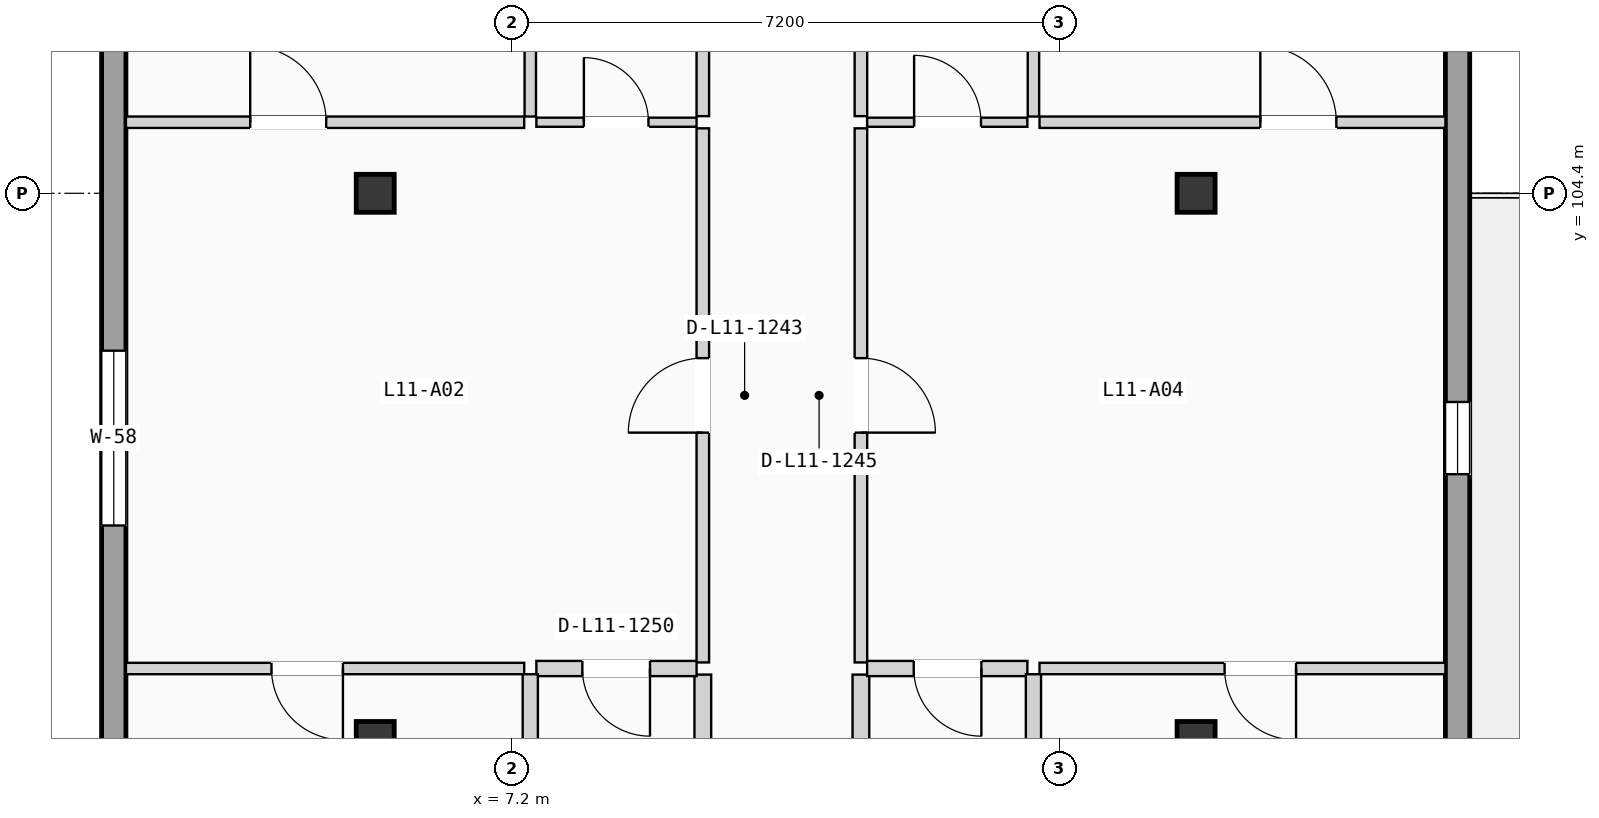
"""IFC4 building model, lengths in metres.
Left out: names, types, materials, properties, quantities, classifications, styles, units other than length and angle.
Written with IfcOpenShell. Run it as: python <this file> out.ifc"""

import sys

from ifc_helpers import new_model, si_unit, direction, frame, frame_2d, origin, origin_2d, place, context, subcontext, project, spatial, rectangle, extrude, element, fill, save


model = new_model("IFC4")
c1 = context("Model", 3, precision=1e-05, world=origin(), true_north=direction((0.0, 1.0)))
c2 = subcontext(c1, "Body", "Model", "MODEL_VIEW")
j1 = project(units=[si_unit("LENGTHUNIT", "METRE"), si_unit("PLANEANGLEUNIT", "RADIAN")], contexts=[c1])
p1 = place(None, origin())
s1 = spatial("IfcSite", under=j1, at=p1, CompositionType="ELEMENT")
p2 = place(p1, origin())
s2 = spatial("IfcBuilding", under=s1, at=p2, CompositionType="ELEMENT")
p3 = place(p2, frame((0.0, 0.0, 37.275)))
s3 = spatial("IfcBuildingStorey", under=s2, at=p3, CompositionType="ELEMENT", Elevation=37.275)
for number, where, z_axis, x_axis in (
    (1, (5.4, 97.2, 0.0), (0.0, 0.0, 1.0), (1.0, 0.0, 0.0)),
    (2, (5.4, 104.4, 0.0), (0.0, 0.0, 1.0), (1.0, 0.0, 0.0)),
    (3, (16.2, 97.2, 0.0), (0.0, 0.0, 1.0), (1.0, 0.0, 0.0)),
    (4, (16.2, 104.4, 0.0), (0.0, 0.0, 1.0), (1.0, 0.0, 0.0)),
):
    element("IfcColumn", number, at=place(p3, frame(where, z_axis=z_axis, x_axis=x_axis)), inside=s3, PredefinedType="COLUMN", context=c2, shape_type="SweptSolid", body=[
        extrude(rectangle(XDim=0.5, YDim=0.5, at=origin_2d()), origin(), (0.0, 0.0, 1.0), 3.15),
    ])
p4 = place(p3, frame((1.96, 68.72, 0.0), z_axis=(0.0, 0.0, 1.0), x_axis=(0.0, 1.0, 0.0)))
e5 = element("IfcWall", 5, at=p4, inside=s3, PredefinedType="SOLIDWALL", context=c2, shape_type="SweptSolid", body=[
    extrude(rectangle(XDim=49.76, YDim=0.32, at=frame_2d((24.88, 0.0))), origin(), (0.0, 0.0, 1.0), 2.9),
])
p5 = place(p4, frame((15.855, 0.0, 0.85)))
e6 = element("IfcOpeningElement", 6, at=p5, cuts=e5, PredefinedType="OPENING", context=c2, shape_type="SweptSolid", body=[
    extrude(rectangle(XDim=0.95, YDim=1.2, at=frame_2d((0.475, 0.6))), frame((0.0, 0.17, 0.0), z_axis=(0.0, -1.0, 0.0), x_axis=(1.0, 0.0, 0.0)), (0.0, 0.0, 1.0), 0.34),
])
p6 = place(p4, frame((8.586, 0.0, 0.9)))
e7 = element("IfcOpeningElement", 7, at=p6, cuts=e5, PredefinedType="OPENING", context=c2, shape_type="SweptSolid", body=[
    extrude(rectangle(XDim=2.3, YDim=1.2, at=frame_2d((1.15, 0.6))), frame((0.0, 0.17, 0.0), z_axis=(0.0, -1.0, 0.0), x_axis=(1.0, 0.0, 0.0)), (0.0, 0.0, 1.0), 0.34),
])
p7 = place(p4, frame((19.265, 0.0, 0.85)))
e8 = element("IfcOpeningElement", 8, at=p7, cuts=e5, PredefinedType="OPENING", context=c2, shape_type="SweptSolid", body=[
    extrude(rectangle(XDim=0.95, YDim=1.2, at=frame_2d((0.475, 0.6))), frame((0.0, 0.17, 0.0), z_axis=(0.0, -1.0, 0.0), x_axis=(1.0, 0.0, 0.0)), (0.0, 0.0, 1.0), 0.34),
])
p8 = place(p4, frame((31.309, 0.0, 0.715)))
e9 = element("IfcOpeningElement", 9, at=p8, cuts=e5, PredefinedType="OPENING", context=c2, shape_type="SweptSolid", body=[
    extrude(rectangle(XDim=2.3, YDim=1.5, at=frame_2d((1.15, 0.75))), frame((0.0, 0.17, 0.0), z_axis=(0.0, -1.0, 0.0), x_axis=(1.0, 0.0, 0.0)), (0.0, 0.0, 1.0), 0.34),
])
p9 = place(p4, frame((24.736, 0.0, 0.565)))
e10 = element("IfcOpeningElement", 10, at=p9, cuts=e5, PredefinedType="OPENING", context=c2, shape_type="SweptSolid", body=[
    extrude(rectangle(XDim=2.3, YDim=1.65, at=frame_2d((1.15, 0.825))), frame((0.0, 0.17, 0.0), z_axis=(0.0, -1.0, 0.0), x_axis=(1.0, 0.0, 0.0)), (0.0, 0.0, 1.0), 0.34),
])
p10 = place(p4, frame((39.113, 0.0, 0.85)))
e11 = element("IfcOpeningElement", 11, at=p10, cuts=e5, PredefinedType="OPENING", context=c2, shape_type="SweptSolid", body=[
    extrude(rectangle(XDim=0.95, YDim=1.2, at=frame_2d((0.475, 0.6))), frame((0.0, 0.17, 0.0), z_axis=(0.0, -1.0, 0.0), x_axis=(1.0, 0.0, 0.0)), (0.0, 0.0, 1.0), 0.34),
])
p11 = place(p3, frame((19.64, 68.72, 0.0), z_axis=(0.0, 0.0, 1.0), x_axis=(0.0, 1.0, 0.0)))
e12 = element("IfcWall", 12, at=p11, inside=s3, PredefinedType="SOLIDWALL", context=c2, shape_type="SweptSolid", body=[
    extrude(rectangle(XDim=49.76, YDim=0.32, at=frame_2d((24.88, 0.0))), origin(), (0.0, 0.0, 1.0), 2.9),
])
p12 = place(p11, frame((16.27, 0.0, 0.0)))
e13 = element("IfcOpeningElement", 13, at=p12, cuts=e12, PredefinedType="OPENING", context=c2, shape_type="SweptSolid", body=[
    extrude(rectangle(XDim=0.95, YDim=2.15, at=frame_2d((0.475, 1.075))), frame((0.0, 0.17, 0.0), z_axis=(0.0, -1.0, 0.0), x_axis=(1.0, 0.0, 0.0)), (0.0, 0.0, 1.0), 0.34),
])
p13 = place(p11, frame((9.261, 0.0, 0.9)))
e14 = element("IfcOpeningElement", 14, at=p13, cuts=e12, PredefinedType="OPENING", context=c2, shape_type="SweptSolid", body=[
    extrude(rectangle(XDim=0.95, YDim=1.2, at=frame_2d((0.475, 0.6))), frame((0.0, 0.17, 0.0), z_axis=(0.0, -1.0, 0.0), x_axis=(1.0, 0.0, 0.0)), (0.0, 0.0, 1.0), 0.34),
])
p14 = place(p11, frame((19.265, 0.0, 0.865)))
e15 = element("IfcOpeningElement", 15, at=p14, cuts=e12, PredefinedType="OPENING", context=c2, shape_type="SweptSolid", body=[
    extrude(rectangle(XDim=0.95, YDim=1.35, at=frame_2d((0.475, 0.675))), frame((0.0, 0.17, 0.0), z_axis=(0.0, -1.0, 0.0), x_axis=(1.0, 0.0, 0.0)), (0.0, 0.0, 1.0), 0.34),
])
p15 = place(p11, frame((31.984, 0.0, 0.715)))
e16 = element("IfcOpeningElement", 16, at=p15, cuts=e12, PredefinedType="OPENING", context=c2, shape_type="SweptSolid", body=[
    extrude(rectangle(XDim=0.95, YDim=1.5, at=frame_2d((0.475, 0.75))), frame((0.0, 0.17, 0.0), z_axis=(0.0, -1.0, 0.0), x_axis=(1.0, 0.0, 0.0)), (0.0, 0.0, 1.0), 0.34),
])
p16 = place(p11, frame((25.411, 0.0, 0.565)))
e17 = element("IfcOpeningElement", 17, at=p16, cuts=e12, PredefinedType="OPENING", context=c2, shape_type="SweptSolid", body=[
    extrude(rectangle(XDim=0.95, YDim=1.65, at=frame_2d((0.475, 0.825))), frame((0.0, 0.17, 0.0), z_axis=(0.0, -1.0, 0.0), x_axis=(1.0, 0.0, 0.0)), (0.0, 0.0, 1.0), 0.34),
])
p17 = place(p11, frame((39.113, 0.0, 0.85)))
e18 = element("IfcOpeningElement", 18, at=p17, cuts=e12, PredefinedType="OPENING", context=c2, shape_type="SweptSolid", body=[
    extrude(rectangle(XDim=0.95, YDim=1.2, at=frame_2d((0.475, 0.6))), frame((0.0, 0.17, 0.0), z_axis=(0.0, -1.0, 0.0), x_axis=(1.0, 0.0, 0.0)), (0.0, 0.0, 1.0), 0.34),
])
p18 = place(p3, frame((9.71, 98.227, 0.0), z_axis=(0.0, 0.0, 1.0), x_axis=(0.0, 1.0, 0.0)))
e19 = element("IfcWall", 19, at=p18, inside=s3, PredefinedType="PARTITIONING", context=c2, shape_type="SweptSolid", body=[
    extrude(rectangle(XDim=7.028, YDim=0.165, at=frame_2d((3.514, 0.0))), origin(), (0.0, 0.0, 1.0), 2.87),
])
p19 = place(p18, frame((3.024, 0.0, 0.0)))
e20 = element("IfcOpeningElement", 20, at=p19, cuts=e19, PredefinedType="OPENING", context=c2, shape_type="SweptSolid", body=[
    extrude(rectangle(XDim=0.98, YDim=2.08, at=frame_2d((0.49, 1.04))), frame((0.0, 0.093, 0.0), z_axis=(0.0, -1.0, 0.0), x_axis=(1.0, 0.0, 0.0)), (0.0, 0.0, 1.0), 0.185),
])
p20 = place(p3, frame((9.71, 92.282, 0.0), z_axis=(0.0, 0.0, 1.0), x_axis=(0.0, 1.0, 0.0)))
e21 = element("IfcWall", 21, at=p20, inside=s3, PredefinedType="PLUMBINGWALL", context=c2, shape_type="SweptSolid", body=[
    extrude(rectangle(XDim=5.785, YDim=0.22, at=frame_2d((2.893, 0.0))), origin(), (0.0, 0.0, 1.0), 2.87),
])
p21 = place(p3, frame((9.71, 105.415, 0.0), z_axis=(0.0, 0.0, 1.0), x_axis=(0.0, 1.0, 0.0)))
e22 = element("IfcWall", 22, at=p21, inside=s3, PredefinedType="PARTITIONING", context=c2, shape_type="SweptSolid", body=[
    extrude(rectangle(XDim=5.785, YDim=0.165, at=frame_2d((2.893, 0.0))), origin(), (0.0, 0.0, 1.0), 2.87),
])
p22 = place(p3, frame((11.79, 98.227, 0.0), z_axis=(0.0, 0.0, 1.0), x_axis=(0.0, 1.0, 0.0)))
e23 = element("IfcWall", 23, at=p22, inside=s3, PredefinedType="PARTITIONING", context=c2, shape_type="SweptSolid", body=[
    extrude(rectangle(XDim=7.028, YDim=0.165, at=frame_2d((3.514, 0.0))), origin(), (0.0, 0.0, 1.0), 2.87),
])
p23 = place(p22, frame((3.024, 0.0, 0.0)))
e24 = element("IfcOpeningElement", 24, at=p23, cuts=e23, PredefinedType="OPENING", context=c2, shape_type="SweptSolid", body=[
    extrude(rectangle(XDim=0.98, YDim=2.08, at=frame_2d((0.49, 1.04))), frame((0.0, 0.093, 0.0), z_axis=(0.0, -1.0, 0.0), x_axis=(1.0, 0.0, 0.0)), (0.0, 0.0, 1.0), 0.185),
])
p24 = place(p3, frame((11.79, 92.282, 0.0), z_axis=(0.0, 0.0, 1.0), x_axis=(0.0, 1.0, 0.0)))
e25 = element("IfcWall", 25, at=p24, inside=s3, PredefinedType="PLUMBINGWALL", context=c2, shape_type="SweptSolid", body=[
    extrude(rectangle(XDim=5.785, YDim=0.22, at=frame_2d((2.893, 0.0))), origin(), (0.0, 0.0, 1.0), 2.87),
])
p25 = place(p3, frame((11.79, 105.415, 0.0), z_axis=(0.0, 0.0, 1.0), x_axis=(0.0, 1.0, 0.0)))
e26 = element("IfcWall", 26, at=p25, inside=s3, PredefinedType="PARTITIONING", context=c2, shape_type="SweptSolid", body=[
    extrude(rectangle(XDim=5.785, YDim=0.165, at=frame_2d((2.893, 0.0))), origin(), (0.0, 0.0, 1.0), 2.87),
])
p26 = place(p3, frame((7.52, 98.147, 0.0), z_axis=(0.0, 0.0, 1.0), x_axis=(1.0, 0.0, 0.0)))
e27 = element("IfcWall", 27, at=p26, inside=s3, PredefinedType="PLUMBINGWALL", context=c2, shape_type="SweptSolid", body=[
    extrude(rectangle(XDim=2.108, YDim=0.2, at=frame_2d((1.054, 0.0))), origin(), (0.0, 0.0, 1.0), 2.87),
])
p27 = place(p26, frame((0.605, 0.0, 0.0)))
e28 = element("IfcOpeningElement", 28, at=p27, cuts=e27, PredefinedType="OPENING", context=c2, shape_type="SweptSolid", body=[
    extrude(rectangle(XDim=0.89, YDim=2.03, at=frame_2d((0.445, 1.015))), frame((0.0, 0.11, 0.0), z_axis=(0.0, -1.0, 0.0), x_axis=(1.0, 0.0, 0.0)), (0.0, 0.0, 1.0), 0.22),
])
p28 = place(p3, frame((7.52, 105.335, 0.0), z_axis=(0.0, 0.0, 1.0), x_axis=(1.0, 0.0, 0.0)))
e29 = element("IfcWall", 29, at=p28, inside=s3, PredefinedType="PARTITIONING", context=c2, shape_type="SweptSolid", body=[
    extrude(rectangle(XDim=2.108, YDim=0.12, at=frame_2d((1.054, 0.0))), origin(), (0.0, 0.0, 1.0), 2.87),
])
p29 = place(p28, frame((0.625, 0.0, 0.0)))
e30 = element("IfcOpeningElement", 30, at=p29, cuts=e29, PredefinedType="OPENING", context=c2, shape_type="SweptSolid", body=[
    extrude(rectangle(XDim=0.85, YDim=2.01, at=frame_2d((0.425, 1.005))), frame((0.0, 0.07, 0.0), z_axis=(0.0, -1.0, 0.0), x_axis=(1.0, 0.0, 0.0)), (0.0, 0.0, 1.0), 0.14),
])
p30 = place(p3, frame((2.12, 98.147, 0.0), z_axis=(0.0, 0.0, 1.0), x_axis=(1.0, 0.0, 0.0)))
e31 = element("IfcWall", 31, at=p30, inside=s3, PredefinedType="PARTITIONING", context=c2, shape_type="SweptSolid", body=[
    extrude(rectangle(XDim=5.24, YDim=0.15, at=frame_2d((2.62, 0.0))), origin(), (0.0, 0.0, 1.0), 2.87),
])
p31 = place(p30, frame((1.915, 0.0, 0.0)))
e32 = element("IfcOpeningElement", 32, at=p31, cuts=e31, PredefinedType="OPENING", context=c2, shape_type="SweptSolid", body=[
    extrude(rectangle(XDim=0.94, YDim=2.06, at=frame_2d((0.47, 1.03))), frame((0.0, 0.085, 0.0), z_axis=(0.0, -1.0, 0.0), x_axis=(1.0, 0.0, 0.0)), (0.0, 0.0, 1.0), 0.17),
])
p32 = place(p3, frame((2.12, 105.335, 0.0), z_axis=(0.0, 0.0, 1.0), x_axis=(1.0, 0.0, 0.0)))
e33 = element("IfcWall", 33, at=p32, inside=s3, PredefinedType="PARTITIONING", context=c2, shape_type="SweptSolid", body=[
    extrude(rectangle(XDim=5.24, YDim=0.15, at=frame_2d((2.62, 0.0))), origin(), (0.0, 0.0, 1.0), 2.87),
])
p33 = place(p32, frame((1.635, 0.0, 0.0)))
e34 = element("IfcOpeningElement", 34, at=p33, cuts=e33, PredefinedType="OPENING", context=c2, shape_type="SweptSolid", body=[
    extrude(rectangle(XDim=1.0, YDim=2.06, at=frame_2d((0.5, 1.03))), frame((0.0, 0.085, 0.0), z_axis=(0.0, -1.0, 0.0), x_axis=(1.0, 0.0, 0.0)), (0.0, 0.0, 1.0), 0.17),
])
p34 = place(p3, frame((7.44, 92.282, 0.0), z_axis=(0.0, 0.0, 1.0), x_axis=(0.0, 1.0, 0.0)))
e35 = element("IfcWall", 35, at=p34, inside=s3, PredefinedType="PLUMBINGWALL", context=c2, shape_type="SweptSolid", body=[
    extrude(rectangle(XDim=5.79, YDim=0.2, at=frame_2d((2.895, 0.0))), origin(), (0.0, 0.0, 1.0), 2.87),
])
p35 = place(p3, frame((7.44, 105.41, 0.0), z_axis=(0.0, 0.0, 1.0), x_axis=(0.0, 1.0, 0.0)))
e36 = element("IfcWall", 36, at=p35, inside=s3, PredefinedType="PARTITIONING", context=c2, shape_type="SweptSolid", body=[
    extrude(rectangle(XDim=5.79, YDim=0.15, at=frame_2d((2.895, 0.0))), origin(), (0.0, 0.0, 1.0), 2.87),
])
p36 = place(p3, frame((11.872, 98.147, 0.0), z_axis=(0.0, 0.0, 1.0), x_axis=(1.0, 0.0, 0.0)))
e37 = element("IfcWall", 37, at=p36, inside=s3, PredefinedType="PLUMBINGWALL", context=c2, shape_type="SweptSolid", body=[
    extrude(rectangle(XDim=2.108, YDim=0.2, at=frame_2d((1.054, 0.0))), origin(), (0.0, 0.0, 1.0), 2.87),
])
p37 = place(p36, frame((0.613, 0.0, 0.0)))
e38 = element("IfcOpeningElement", 38, at=p37, cuts=e37, PredefinedType="OPENING", context=c2, shape_type="SweptSolid", body=[
    extrude(rectangle(XDim=0.89, YDim=2.03, at=frame_2d((0.445, 1.015))), frame((0.0, 0.11, 0.0), z_axis=(0.0, -1.0, 0.0), x_axis=(1.0, 0.0, 0.0)), (0.0, 0.0, 1.0), 0.22),
])
p38 = place(p3, frame((11.872, 105.335, 0.0), z_axis=(0.0, 0.0, 1.0), x_axis=(1.0, 0.0, 0.0)))
e39 = element("IfcWall", 39, at=p38, inside=s3, PredefinedType="PARTITIONING", context=c2, shape_type="SweptSolid", body=[
    extrude(rectangle(XDim=2.108, YDim=0.12, at=frame_2d((1.054, 0.0))), origin(), (0.0, 0.0, 1.0), 2.87),
])
p39 = place(p38, frame((0.618, 0.0, 0.0)))
e40 = element("IfcOpeningElement", 40, at=p39, cuts=e39, PredefinedType="OPENING", context=c2, shape_type="SweptSolid", body=[
    extrude(rectangle(XDim=0.88, YDim=2.02, at=frame_2d((0.44, 1.01))), frame((0.0, 0.07, 0.0), z_axis=(0.0, -1.0, 0.0), x_axis=(1.0, 0.0, 0.0)), (0.0, 0.0, 1.0), 0.14),
])
p40 = place(p3, frame((14.14, 98.147, 0.0), z_axis=(0.0, 0.0, 1.0), x_axis=(1.0, 0.0, 0.0)))
e41 = element("IfcWall", 41, at=p40, inside=s3, PredefinedType="PARTITIONING", context=c2, shape_type="SweptSolid", body=[
    extrude(rectangle(XDim=5.34, YDim=0.15, at=frame_2d((2.67, 0.0))), origin(), (0.0, 0.0, 1.0), 2.87),
])
p41 = place(p40, frame((2.435, 0.0, 0.0)))
e42 = element("IfcOpeningElement", 42, at=p41, cuts=e41, PredefinedType="OPENING", context=c2, shape_type="SweptSolid", body=[
    extrude(rectangle(XDim=0.94, YDim=2.06, at=frame_2d((0.47, 1.03))), frame((0.0, 0.085, 0.0), z_axis=(0.0, -1.0, 0.0), x_axis=(1.0, 0.0, 0.0)), (0.0, 0.0, 1.0), 0.17),
])
p42 = place(p3, frame((14.14, 105.335, 0.0), z_axis=(0.0, 0.0, 1.0), x_axis=(1.0, 0.0, 0.0)))
e43 = element("IfcWall", 43, at=p42, inside=s3, PredefinedType="PARTITIONING", context=c2, shape_type="SweptSolid", body=[
    extrude(rectangle(XDim=5.34, YDim=0.15, at=frame_2d((2.67, 0.0))), origin(), (0.0, 0.0, 1.0), 2.87),
])
p43 = place(p42, frame((2.905, 0.0, 0.0)))
e44 = element("IfcOpeningElement", 44, at=p43, cuts=e43, PredefinedType="OPENING", context=c2, shape_type="SweptSolid", body=[
    extrude(rectangle(XDim=1.0, YDim=2.06, at=frame_2d((0.5, 1.03))), frame((0.0, 0.085, 0.0), z_axis=(0.0, -1.0, 0.0), x_axis=(1.0, 0.0, 0.0)), (0.0, 0.0, 1.0), 0.17),
])
p44 = place(p3, frame((14.06, 92.282, 0.0), z_axis=(0.0, 0.0, 1.0), x_axis=(0.0, 1.0, 0.0)))
e45 = element("IfcWall", 45, at=p44, inside=s3, PredefinedType="PLUMBINGWALL", context=c2, shape_type="SweptSolid", body=[
    extrude(rectangle(XDim=5.79, YDim=0.2, at=frame_2d((2.895, 0.0))), origin(), (0.0, 0.0, 1.0), 2.87),
])
p45 = place(p3, frame((14.06, 105.41, 0.0), z_axis=(0.0, 0.0, 1.0), x_axis=(0.0, 1.0, 0.0)))
e46 = element("IfcWall", 46, at=p45, inside=s3, PredefinedType="PARTITIONING", context=c2, shape_type="SweptSolid", body=[
    extrude(rectangle(XDim=5.79, YDim=0.15, at=frame_2d((2.895, 0.0))), origin(), (0.0, 0.0, 1.0), 2.87),
])
p46 = place(p8, origin())
e47 = element("IfcWindow", 47, at=p46, inside=s3, PartitioningType="DOUBLE_PANEL_VERTICAL", PredefinedType="WINDOW", context=c2, shape_type="SweptSolid", body=[
    extrude(rectangle(XDim=2.3, YDim=1.5, at=frame_2d((1.15, 0.75))), frame((0.0, 0.03, 0.0), z_axis=(0.0, -1.0, 0.0), x_axis=(1.0, 0.0, 0.0)), (0.0, 0.0, 1.0), 0.06),
])
fill(e9, e47)
p47 = place(p15, origin())
e48 = element("IfcWindow", 48, at=p47, inside=s3, PartitioningType="SINGLE_PANEL", PredefinedType="WINDOW", context=c2, shape_type="SweptSolid", body=[
    extrude(rectangle(XDim=0.95, YDim=1.5, at=frame_2d((0.475, 0.75))), frame((0.0, 0.03, 0.0), z_axis=(0.0, -1.0, 0.0), x_axis=(1.0, 0.0, 0.0)), (0.0, 0.0, 1.0), 0.06),
])
fill(e16, e48)
p48 = place(p19, origin())
e49 = element("IfcDoor", 49, at=p48, inside=s3, OperationType="SINGLE_SWING_LEFT", PredefinedType="DOOR", context=c2, shape_type="SweptSolid", body=[
    extrude(rectangle(XDim=0.98, YDim=2.08, at=frame_2d((0.49, 1.04))), frame((0.0, 0.025, 0.0), z_axis=(0.0, -1.0, 0.0), x_axis=(1.0, 0.0, 0.0)), (0.0, 0.0, 1.0), 0.05),
])
fill(e20, e49)
p49 = place(p23, frame((0.98, 0.0, 0.0), z_axis=(0.0, 0.0, 1.0), x_axis=(-1.0, 0.0, 0.0)))
e50 = element("IfcDoor", 50, at=p49, inside=s3, OperationType="SINGLE_SWING_LEFT", PredefinedType="DOOR", context=c2, shape_type="SweptSolid", body=[
    extrude(rectangle(XDim=0.98, YDim=2.08, at=frame_2d((0.49, 1.04))), frame((0.0, 0.025, 0.0), z_axis=(0.0, -1.0, 0.0), x_axis=(1.0, 0.0, 0.0)), (0.0, 0.0, 1.0), 0.05),
])
fill(e24, e50)
p50 = place(p27, frame((0.89, 0.0, 0.0), z_axis=(0.0, 0.0, 1.0), x_axis=(-1.0, 0.0, 0.0)))
e51 = element("IfcDoor", 51, at=p50, inside=s3, OperationType="SINGLE_SWING_RIGHT", PredefinedType="DOOR", context=c2, shape_type="SweptSolid", body=[
    extrude(rectangle(XDim=0.89, YDim=2.03, at=frame_2d((0.445, 1.015))), frame((0.0, 0.025, 0.0), z_axis=(0.0, -1.0, 0.0), x_axis=(1.0, 0.0, 0.0)), (0.0, 0.0, 1.0), 0.05),
])
fill(e28, e51)
p51 = place(p29, origin())
e52 = element("IfcDoor", 52, at=p51, inside=s3, OperationType="SINGLE_SWING_LEFT", PredefinedType="DOOR", context=c2, shape_type="SweptSolid", body=[
    extrude(rectangle(XDim=0.85, YDim=2.01, at=frame_2d((0.425, 1.005))), frame((0.0, 0.025, 0.0), z_axis=(0.0, -1.0, 0.0), x_axis=(1.0, 0.0, 0.0)), (0.0, 0.0, 1.0), 0.05),
])
fill(e30, e52)
p52 = place(p31, frame((0.94, 0.0, 0.0), z_axis=(0.0, 0.0, 1.0), x_axis=(-1.0, 0.0, 0.0)))
e53 = element("IfcDoor", 53, at=p52, inside=s3, OperationType="SINGLE_SWING_RIGHT", PredefinedType="DOOR", context=c2, shape_type="SweptSolid", body=[
    extrude(rectangle(XDim=0.94, YDim=2.06, at=frame_2d((0.47, 1.03))), frame((0.0, 0.025, 0.0), z_axis=(0.0, -1.0, 0.0), x_axis=(1.0, 0.0, 0.0)), (0.0, 0.0, 1.0), 0.05),
])
fill(e32, e53)
p53 = place(p33, origin())
e54 = element("IfcDoor", 54, at=p53, inside=s3, OperationType="SINGLE_SWING_LEFT", PredefinedType="DOOR", context=c2, shape_type="SweptSolid", body=[
    extrude(rectangle(XDim=1.0, YDim=2.06, at=frame_2d((0.5, 1.03))), frame((0.0, 0.025, 0.0), z_axis=(0.0, -1.0, 0.0), x_axis=(1.0, 0.0, 0.0)), (0.0, 0.0, 1.0), 0.05),
])
fill(e34, e54)
p54 = place(p37, frame((0.89, 0.0, 0.0), z_axis=(0.0, 0.0, 1.0), x_axis=(-1.0, 0.0, 0.0)))
e55 = element("IfcDoor", 55, at=p54, inside=s3, OperationType="SINGLE_SWING_RIGHT", PredefinedType="DOOR", context=c2, shape_type="SweptSolid", body=[
    extrude(rectangle(XDim=0.89, YDim=2.03, at=frame_2d((0.445, 1.015))), frame((0.0, 0.025, 0.0), z_axis=(0.0, -1.0, 0.0), x_axis=(1.0, 0.0, 0.0)), (0.0, 0.0, 1.0), 0.05),
])
fill(e38, e55)
p55 = place(p39, origin())
e56 = element("IfcDoor", 56, at=p55, inside=s3, OperationType="SINGLE_SWING_LEFT", PredefinedType="DOOR", context=c2, shape_type="SweptSolid", body=[
    extrude(rectangle(XDim=0.88, YDim=2.02, at=frame_2d((0.44, 1.01))), frame((0.0, 0.025, 0.0), z_axis=(0.0, -1.0, 0.0), x_axis=(1.0, 0.0, 0.0)), (0.0, 0.0, 1.0), 0.05),
])
fill(e40, e56)
p56 = place(p41, frame((0.94, 0.0, 0.0), z_axis=(0.0, 0.0, 1.0), x_axis=(-1.0, 0.0, 0.0)))
e57 = element("IfcDoor", 57, at=p56, inside=s3, OperationType="SINGLE_SWING_RIGHT", PredefinedType="DOOR", context=c2, shape_type="SweptSolid", body=[
    extrude(rectangle(XDim=0.94, YDim=2.06, at=frame_2d((0.47, 1.03))), frame((0.0, 0.025, 0.0), z_axis=(0.0, -1.0, 0.0), x_axis=(1.0, 0.0, 0.0)), (0.0, 0.0, 1.0), 0.05),
])
fill(e42, e57)
p57 = place(p43, origin())
e58 = element("IfcDoor", 58, at=p57, inside=s3, OperationType="SINGLE_SWING_LEFT", PredefinedType="DOOR", context=c2, shape_type="SweptSolid", body=[
    extrude(rectangle(XDim=1.0, YDim=2.06, at=frame_2d((0.5, 1.03))), frame((0.0, 0.025, 0.0), z_axis=(0.0, -1.0, 0.0), x_axis=(1.0, 0.0, 0.0)), (0.0, 0.0, 1.0), 0.05),
])
fill(e44, e58)
save(model, sys.argv[1])
